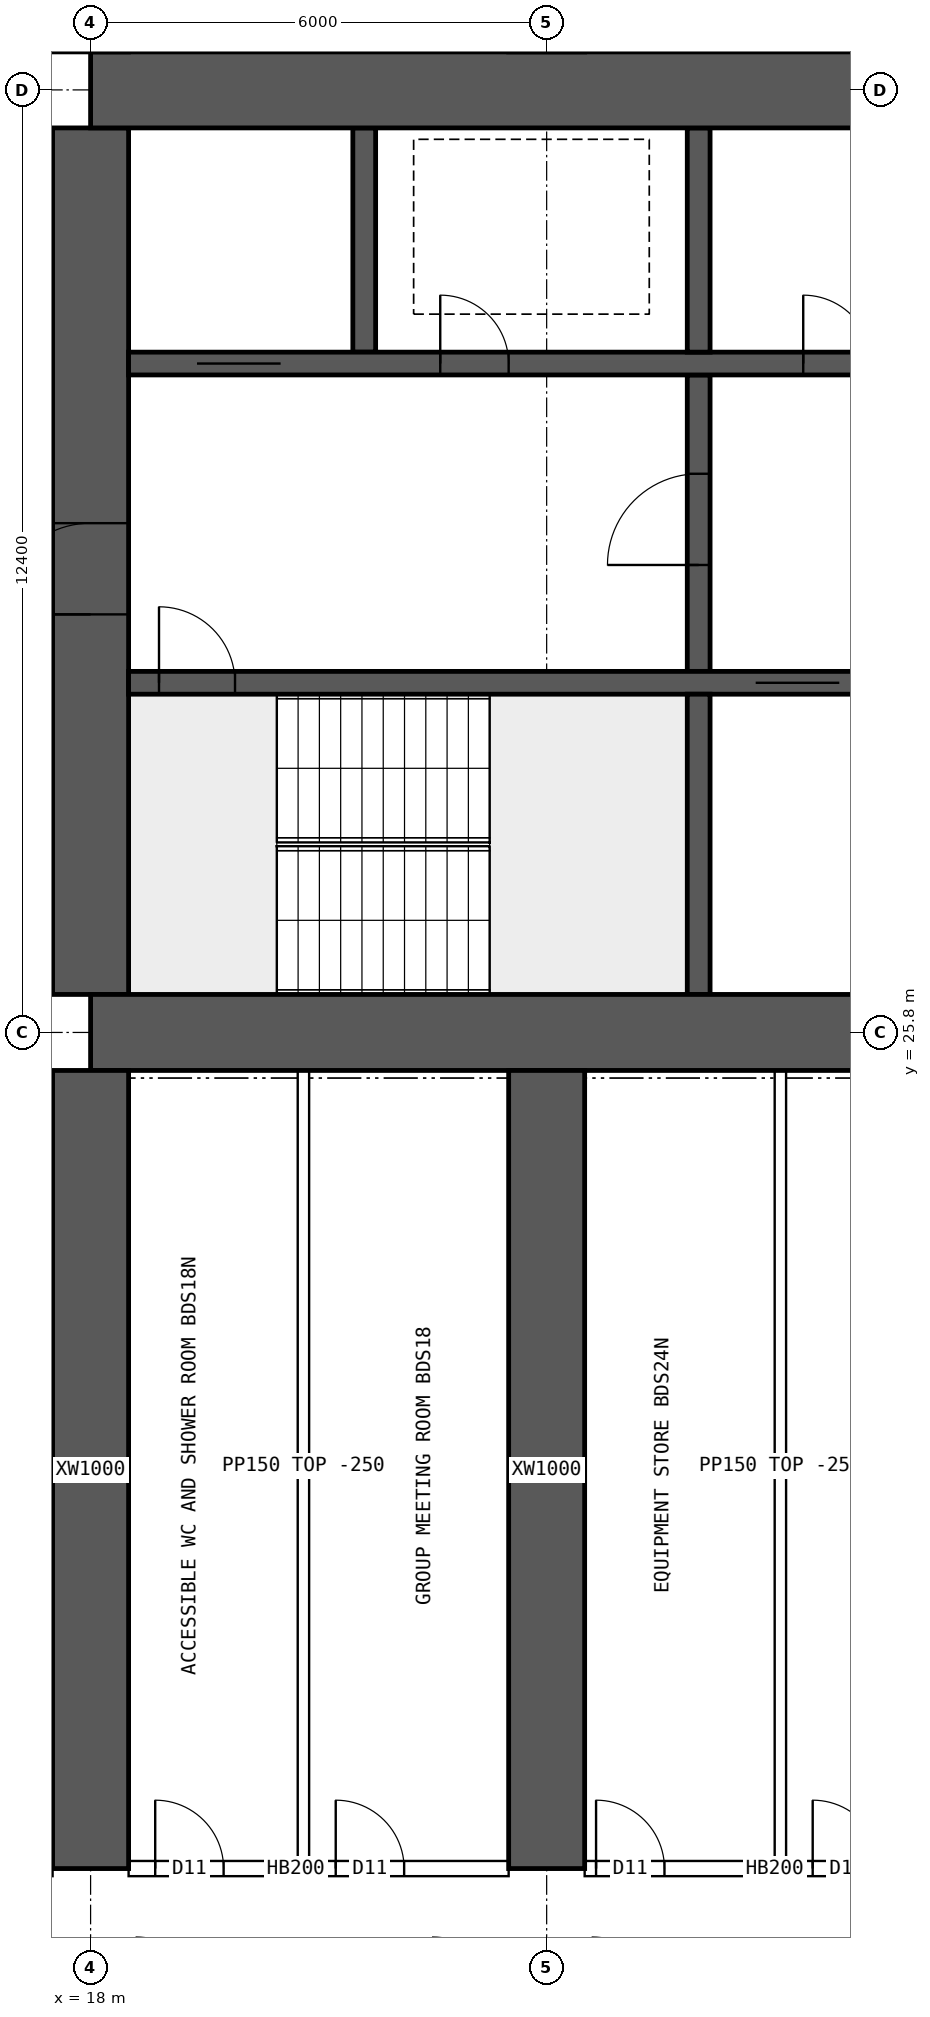
"""IFC4 building model, lengths in metres.
Left out: names, types, materials, properties, quantities, classifications, styles, units other than length and angle.
Written with IfcOpenShell. Run it as: python <this file> out.ifc"""

import sys

from ifc_helpers import new_model, si_unit, direction, frame, frame_2d, origin, place, context, subcontext, project, spatial, rectangle, extrude, element, fill, save


model = new_model("IFC4")
c1 = context("Model", 3, precision=1e-05, world=origin(), true_north=direction((0.0, 1.0)))
c2 = subcontext(c1, "Body", "Model", "MODEL_VIEW")
j1 = project(units=[si_unit("LENGTHUNIT", "METRE"), si_unit("PLANEANGLEUNIT", "RADIAN")], contexts=[c1])
p1 = place(None, origin())
s1 = spatial("IfcSite", under=j1, at=p1, CompositionType="ELEMENT")
p2 = place(p1, origin())
s2 = spatial("IfcBuilding", under=s1, at=p2, CompositionType="ELEMENT")
p3 = place(p2, frame((0.0, 0.0, 31.45)))
s3 = spatial("IfcBuildingStorey", under=s2, at=p3, CompositionType="ELEMENT", Elevation=31.45)
for number, where, z_axis, x_axis in (
    (1, (18.0, 25.8, 0.0), (0.0, 0.0, 1.0), (1.0, 0.0, 0.0)),
    (2, (18.0, 38.2, 0.0), (0.0, 0.0, 1.0), (1.0, 0.0, 0.0)),
):
    element("IfcWall", number, at=place(p3, frame(where, z_axis=z_axis, x_axis=x_axis)), inside=s3, PredefinedType="SHEAR", context=c2, shape_type="SweptSolid", body=[
        extrude(rectangle(XDim=48.0, YDim=1.0, at=frame_2d((24.0, 0.0))), origin(), (0.0, 0.0, 1.0), 3.75),
    ])
p4 = place(p3, frame((18.0, 26.3, 0.0), z_axis=(0.0, 0.0, 1.0), x_axis=(0.0, 1.0, 0.0)))
e3 = element("IfcWall", 3, at=p4, inside=s3, PredefinedType="SHEAR", context=c2, shape_type="SweptSolid", body=[
    extrude(rectangle(XDim=11.4, YDim=1.0, at=frame_2d((5.7, 0.0))), origin(), (0.0, 0.0, 1.0), 3.75),
])
p5 = place(p4, frame((5.0, 0.0, 0.0)))
e4 = element("IfcOpeningElement", 4, at=p5, cuts=e3, PredefinedType="OPENING", context=c2, shape_type="SweptSolid", body=[
    extrude(rectangle(XDim=1.2, YDim=2.1, at=frame_2d((0.6, 1.05))), frame((0.0, 0.51, 0.0), z_axis=(0.0, -1.0, 0.0), x_axis=(1.0, 0.0, 0.0)), (0.0, 0.0, 1.0), 1.02),
])
p6 = place(p3, frame((18.5, 30.4, 0.0), z_axis=(0.0, 0.0, 1.0), x_axis=(1.0, 0.0, 0.0)))
e5 = element("IfcWall", 5, at=p6, inside=s3, PredefinedType="SHEAR", context=c2, shape_type="SweptSolid", body=[
    extrude(rectangle(XDim=47.0, YDim=0.3, at=frame_2d((23.5, 0.0))), origin(), (0.0, 0.0, 1.0), 3.75),
])
p7 = place(p6, frame((0.4, 0.0, 0.0)))
e6 = element("IfcOpeningElement", 6, at=p7, cuts=e5, PredefinedType="OPENING", context=c2, shape_type="SweptSolid", body=[
    extrude(rectangle(XDim=1.0, YDim=2.1, at=frame_2d((0.5, 1.05))), frame((0.0, 0.16, 0.0), z_axis=(0.0, -1.0, 0.0), x_axis=(1.0, 0.0, 0.0)), (0.0, 0.0, 1.0), 0.32),
])
p8 = place(p6, frame((45.6, 0.0, 0.0)))
e7 = element("IfcOpeningElement", 7, at=p8, cuts=e5, PredefinedType="OPENING", context=c2, shape_type="SweptSolid", body=[
    extrude(rectangle(XDim=1.0, YDim=2.1, at=frame_2d((0.5, 1.05))), frame((0.0, 0.16, 0.0), z_axis=(0.0, -1.0, 0.0), x_axis=(1.0, 0.0, 0.0)), (0.0, 0.0, 1.0), 0.32),
])
p9 = place(p6, frame((8.25, 0.0, 0.0)))
e8 = element("IfcOpeningElement", 8, at=p9, cuts=e5, PredefinedType="OPENING", context=c2, shape_type="SweptSolid", body=[
    extrude(rectangle(XDim=1.1, YDim=2.1, at=frame_2d((0.55, 1.05))), frame((0.0, 0.16, 0.0), z_axis=(0.0, -1.0, 0.0), x_axis=(1.0, 0.0, 0.0)), (0.0, 0.0, 1.0), 0.32),
])
p10 = place(p6, frame((10.85, 0.0, 0.0)))
e9 = element("IfcOpeningElement", 9, at=p10, cuts=e5, PredefinedType="OPENING", context=c2, shape_type="SweptSolid", body=[
    extrude(rectangle(XDim=1.1, YDim=2.1, at=frame_2d((0.55, 1.05))), frame((0.0, 0.16, 0.0), z_axis=(0.0, -1.0, 0.0), x_axis=(1.0, 0.0, 0.0)), (0.0, 0.0, 1.0), 0.32),
])
p11 = place(p6, frame((13.45, 0.0, 0.0)))
e10 = element("IfcOpeningElement", 10, at=p11, cuts=e5, PredefinedType="OPENING", context=c2, shape_type="SweptSolid", body=[
    extrude(rectangle(XDim=1.1, YDim=2.1, at=frame_2d((0.55, 1.05))), frame((0.0, 0.16, 0.0), z_axis=(0.0, -1.0, 0.0), x_axis=(1.0, 0.0, 0.0)), (0.0, 0.0, 1.0), 0.32),
])
p12 = place(p6, frame((16.05, 0.0, 0.0)))
e11 = element("IfcOpeningElement", 11, at=p12, cuts=e5, PredefinedType="OPENING", context=c2, shape_type="SweptSolid", body=[
    extrude(rectangle(XDim=1.1, YDim=2.1, at=frame_2d((0.55, 1.05))), frame((0.0, 0.16, 0.0), z_axis=(0.0, -1.0, 0.0), x_axis=(1.0, 0.0, 0.0)), (0.0, 0.0, 1.0), 0.32),
])
p13 = place(p6, frame((30.117, 0.0, 0.0)))
e12 = element("IfcOpeningElement", 12, at=p13, cuts=e5, PredefinedType="OPENING", context=c2, shape_type="SweptSolid", body=[
    extrude(rectangle(XDim=1.1, YDim=2.1, at=frame_2d((0.55, 1.05))), frame((0.0, 0.16, 0.0), z_axis=(0.0, -1.0, 0.0), x_axis=(1.0, 0.0, 0.0)), (0.0, 0.0, 1.0), 0.32),
])
p14 = place(p6, frame((33.65, 0.0, 0.0)))
e13 = element("IfcOpeningElement", 13, at=p14, cuts=e5, PredefinedType="OPENING", context=c2, shape_type="SweptSolid", body=[
    extrude(rectangle(XDim=1.1, YDim=2.1, at=frame_2d((0.55, 1.05))), frame((0.0, 0.16, 0.0), z_axis=(0.0, -1.0, 0.0), x_axis=(1.0, 0.0, 0.0)), (0.0, 0.0, 1.0), 0.32),
])
p15 = place(p6, frame((37.183, 0.0, 0.0)))
e14 = element("IfcOpeningElement", 14, at=p15, cuts=e5, PredefinedType="OPENING", context=c2, shape_type="SweptSolid", body=[
    extrude(rectangle(XDim=1.1, YDim=2.1, at=frame_2d((0.55, 1.05))), frame((0.0, 0.16, 0.0), z_axis=(0.0, -1.0, 0.0), x_axis=(1.0, 0.0, 0.0)), (0.0, 0.0, 1.0), 0.32),
])
p16 = place(p3, frame((18.5, 34.6, 0.0), z_axis=(0.0, 0.0, 1.0), x_axis=(1.0, 0.0, 0.0)))
e15 = element("IfcWall", 15, at=p16, inside=s3, PredefinedType="SHEAR", context=c2, shape_type="SweptSolid", body=[
    extrude(rectangle(XDim=47.0, YDim=0.3, at=frame_2d((23.5, 0.0))), origin(), (0.0, 0.0, 1.0), 3.75),
])
p17 = place(p16, frame((0.9, 0.0, 0.0)))
e16 = element("IfcOpeningElement", 16, at=p17, cuts=e15, PredefinedType="OPENING", context=c2, shape_type="SweptSolid", body=[
    extrude(rectangle(XDim=1.1, YDim=2.1, at=frame_2d((0.55, 1.05))), frame((0.0, 0.16, 0.0), z_axis=(0.0, -1.0, 0.0), x_axis=(1.0, 0.0, 0.0)), (0.0, 0.0, 1.0), 0.32),
])
p18 = place(p16, frame((45.0, 0.0, 0.0)))
e17 = element("IfcOpeningElement", 17, at=p18, cuts=e15, PredefinedType="OPENING", context=c2, shape_type="SweptSolid", body=[
    extrude(rectangle(XDim=1.1, YDim=2.1, at=frame_2d((0.55, 1.05))), frame((0.0, 0.16, 0.0), z_axis=(0.0, -1.0, 0.0), x_axis=(1.0, 0.0, 0.0)), (0.0, 0.0, 1.0), 0.32),
])
p19 = place(p16, frame((4.1, 0.0, 0.0)))
e18 = element("IfcOpeningElement", 18, at=p19, cuts=e15, PredefinedType="OPENING", context=c2, shape_type="SweptSolid", body=[
    extrude(rectangle(XDim=0.9, YDim=2.1, at=frame_2d((0.45, 1.05))), frame((0.0, 0.16, 0.0), z_axis=(0.0, -1.0, 0.0), x_axis=(1.0, 0.0, 0.0)), (0.0, 0.0, 1.0), 0.32),
])
p20 = place(p16, frame((42.0, 0.0, 0.0)))
e19 = element("IfcOpeningElement", 19, at=p20, cuts=e15, PredefinedType="OPENING", context=c2, shape_type="SweptSolid", body=[
    extrude(rectangle(XDim=0.9, YDim=2.1, at=frame_2d((0.45, 1.05))), frame((0.0, 0.16, 0.0), z_axis=(0.0, -1.0, 0.0), x_axis=(1.0, 0.0, 0.0)), (0.0, 0.0, 1.0), 0.32),
])
p21 = place(p16, frame((8.875, 0.0, 0.0)))
e20 = element("IfcOpeningElement", 20, at=p21, cuts=e15, PredefinedType="OPENING", context=c2, shape_type="SweptSolid", body=[
    extrude(rectangle(XDim=0.9, YDim=2.1, at=frame_2d((0.45, 1.05))), frame((0.0, 0.16, 0.0), z_axis=(0.0, -1.0, 0.0), x_axis=(1.0, 0.0, 0.0)), (0.0, 0.0, 1.0), 0.32),
])
p22 = place(p16, frame((12.849, 0.0, 0.0)))
e21 = element("IfcOpeningElement", 21, at=p22, cuts=e15, PredefinedType="OPENING", context=c2, shape_type="SweptSolid", body=[
    extrude(rectangle(XDim=0.9, YDim=2.1, at=frame_2d((0.45, 1.05))), frame((0.0, 0.16, 0.0), z_axis=(0.0, -1.0, 0.0), x_axis=(1.0, 0.0, 0.0)), (0.0, 0.0, 1.0), 0.32),
])
p23 = place(p16, frame((16.496, 0.0, 0.0)))
e22 = element("IfcOpeningElement", 22, at=p23, cuts=e15, PredefinedType="OPENING", context=c2, shape_type="SweptSolid", body=[
    extrude(rectangle(XDim=0.9, YDim=2.1, at=frame_2d((0.45, 1.05))), frame((0.0, 0.16, 0.0), z_axis=(0.0, -1.0, 0.0), x_axis=(1.0, 0.0, 0.0)), (0.0, 0.0, 1.0), 0.32),
])
p24 = place(p16, frame((20.255, 0.0, 0.0)))
e23 = element("IfcOpeningElement", 23, at=p24, cuts=e15, PredefinedType="OPENING", context=c2, shape_type="SweptSolid", body=[
    extrude(rectangle(XDim=0.9, YDim=2.1, at=frame_2d((0.45, 1.05))), frame((0.0, 0.16, 0.0), z_axis=(0.0, -1.0, 0.0), x_axis=(1.0, 0.0, 0.0)), (0.0, 0.0, 1.0), 0.32),
])
p25 = place(p16, frame((24.661, 0.0, 0.0)))
e24 = element("IfcOpeningElement", 24, at=p25, cuts=e15, PredefinedType="OPENING", context=c2, shape_type="SweptSolid", body=[
    extrude(rectangle(XDim=0.9, YDim=2.1, at=frame_2d((0.45, 1.05))), frame((0.0, 0.16, 0.0), z_axis=(0.0, -1.0, 0.0), x_axis=(1.0, 0.0, 0.0)), (0.0, 0.0, 1.0), 0.32),
])
p26 = place(p16, frame((27.458, 0.0, 0.0)))
e25 = element("IfcOpeningElement", 25, at=p26, cuts=e15, PredefinedType="OPENING", context=c2, shape_type="SweptSolid", body=[
    extrude(rectangle(XDim=0.9, YDim=2.1, at=frame_2d((0.45, 1.05))), frame((0.0, 0.16, 0.0), z_axis=(0.0, -1.0, 0.0), x_axis=(1.0, 0.0, 0.0)), (0.0, 0.0, 1.0), 0.32),
])
p27 = place(p16, frame((29.425, 0.0, 0.0)))
e26 = element("IfcOpeningElement", 26, at=p27, cuts=e15, PredefinedType="OPENING", context=c2, shape_type="SweptSolid", body=[
    extrude(rectangle(XDim=0.9, YDim=2.1, at=frame_2d((0.45, 1.05))), frame((0.0, 0.16, 0.0), z_axis=(0.0, -1.0, 0.0), x_axis=(1.0, 0.0, 0.0)), (0.0, 0.0, 1.0), 0.32),
])
p28 = place(p16, frame((31.857, 0.0, 0.0)))
e27 = element("IfcOpeningElement", 27, at=p28, cuts=e15, PredefinedType="OPENING", context=c2, shape_type="SweptSolid", body=[
    extrude(rectangle(XDim=0.9, YDim=2.1, at=frame_2d((0.45, 1.05))), frame((0.0, 0.16, 0.0), z_axis=(0.0, -1.0, 0.0), x_axis=(1.0, 0.0, 0.0)), (0.0, 0.0, 1.0), 0.32),
])
p29 = place(p16, frame((34.592, 0.0, 0.0)))
e28 = element("IfcOpeningElement", 28, at=p29, cuts=e15, PredefinedType="OPENING", context=c2, shape_type="SweptSolid", body=[
    extrude(rectangle(XDim=0.9, YDim=2.1, at=frame_2d((0.45, 1.05))), frame((0.0, 0.16, 0.0), z_axis=(0.0, -1.0, 0.0), x_axis=(1.0, 0.0, 0.0)), (0.0, 0.0, 1.0), 0.32),
])
p30 = place(p16, frame((37.632, 0.0, 0.0)))
e29 = element("IfcOpeningElement", 29, at=p30, cuts=e15, PredefinedType="OPENING", context=c2, shape_type="SweptSolid", body=[
    extrude(rectangle(XDim=0.9, YDim=2.1, at=frame_2d((0.45, 1.05))), frame((0.0, 0.16, 0.0), z_axis=(0.0, -1.0, 0.0), x_axis=(1.0, 0.0, 0.0)), (0.0, 0.0, 1.0), 0.32),
])
p31 = place(p3, frame((26.0, 26.3, 0.0), z_axis=(0.0, 0.0, 1.0), x_axis=(0.0, 1.0, 0.0)))
e30 = element("IfcWall", 30, at=p31, inside=s3, PredefinedType="SHEAR", context=c2, shape_type="SweptSolid", body=[
    extrude(rectangle(XDim=3.95, YDim=0.3, at=frame_2d((1.975, 0.0))), origin(), (0.0, 0.0, 1.0), 3.75),
])
p32 = place(p3, frame((26.0, 30.55, 0.0), z_axis=(0.0, 0.0, 1.0), x_axis=(0.0, 1.0, 0.0)))
e31 = element("IfcWall", 31, at=p32, inside=s3, PredefinedType="SHEAR", context=c2, shape_type="SweptSolid", body=[
    extrude(rectangle(XDim=3.9, YDim=0.3, at=frame_2d((1.95, 0.0))), origin(), (0.0, 0.0, 1.0), 3.75),
])
p33 = place(p32, frame((1.4, 0.0, 0.0)))
e32 = element("IfcOpeningElement", 32, at=p33, cuts=e31, PredefinedType="OPENING", context=c2, shape_type="SweptSolid", body=[
    extrude(rectangle(XDim=1.2, YDim=2.1, at=frame_2d((0.6, 1.05))), frame((0.0, 0.16, 0.0), z_axis=(0.0, -1.0, 0.0), x_axis=(1.0, 0.0, 0.0)), (0.0, 0.0, 1.0), 0.32),
])
for number, where, z_axis, x_axis in (
    (33, (21.6, 34.75, 0.0), (0.0, 0.0, 1.0), (0.0, 1.0, 0.0)),
    (34, (26.0, 34.75, 0.0), (0.0, 0.0, 1.0), (0.0, 1.0, 0.0)),
):
    element("IfcWall", number, at=place(p3, frame(where, z_axis=z_axis, x_axis=x_axis)), inside=s3, PredefinedType="SHEAR", context=c2, shape_type="SweptSolid", body=[
        extrude(rectangle(XDim=2.95, YDim=0.3, at=frame_2d((1.475, 0.0))), origin(), (0.0, 0.0, 1.0), 3.75),
    ])
for number, where, z_axis, x_axis in (
    (35, (18.0, 14.8, 0.0), (0.0, 0.0, 1.0), (0.0, 1.0, 0.0)),
    (36, (24.0, 14.8, 0.0), (0.0, 0.0, 1.0), (0.0, 1.0, 0.0)),
):
    element("IfcWall", number, at=place(p3, frame(where, z_axis=z_axis, x_axis=x_axis)), inside=s3, PredefinedType="SHEAR", context=c2, shape_type="SweptSolid", body=[
        extrude(rectangle(XDim=10.5, YDim=1.0, at=frame_2d((5.25, 0.0))), origin(), (0.0, 0.0, 1.0), 3.75),
    ])
p34 = place(p3, frame((18.5, 14.8, 0.0), z_axis=(0.0, 0.0, 1.0), x_axis=(1.0, 0.0, 0.0)))
e37 = element("IfcWall", 37, at=p34, inside=s3, PredefinedType="SOLIDWALL", context=c2, shape_type="SweptSolid", body=[
    extrude(rectangle(XDim=5.0, YDim=0.2, at=frame_2d((2.5, 0.0))), origin(), (0.0, 0.0, 1.0), 3.5),
])
p35 = place(p34, frame((0.35, 0.0, 0.0)))
e38 = element("IfcOpeningElement", 38, at=p35, cuts=e37, PredefinedType="OPENING", context=c2, shape_type="SweptSolid", body=[
    extrude(rectangle(XDim=0.9, YDim=2.1, at=frame_2d((0.45, 1.05))), frame((0.0, 0.11, 0.0), z_axis=(0.0, -1.0, 0.0), x_axis=(1.0, 0.0, 0.0)), (0.0, 0.0, 1.0), 0.22),
])
p36 = place(p34, frame((2.725, 0.0, 0.0)))
e39 = element("IfcOpeningElement", 39, at=p36, cuts=e37, PredefinedType="OPENING", context=c2, shape_type="SweptSolid", body=[
    extrude(rectangle(XDim=0.9, YDim=2.1, at=frame_2d((0.45, 1.05))), frame((0.0, 0.11, 0.0), z_axis=(0.0, -1.0, 0.0), x_axis=(1.0, 0.0, 0.0)), (0.0, 0.0, 1.0), 0.22),
])
p37 = place(p3, frame((24.5, 14.8, 0.0), z_axis=(0.0, 0.0, 1.0), x_axis=(1.0, 0.0, 0.0)))
e40 = element("IfcWall", 40, at=p37, inside=s3, PredefinedType="SOLIDWALL", context=c2, shape_type="SweptSolid", body=[
    extrude(rectangle(XDim=5.0, YDim=0.2, at=frame_2d((2.5, 0.0))), origin(), (0.0, 0.0, 1.0), 3.5),
])
p38 = place(p37, frame((0.15, 0.0, 0.0)))
e41 = element("IfcOpeningElement", 41, at=p38, cuts=e40, PredefinedType="OPENING", context=c2, shape_type="SweptSolid", body=[
    extrude(rectangle(XDim=0.9, YDim=2.1, at=frame_2d((0.45, 1.05))), frame((0.0, 0.11, 0.0), z_axis=(0.0, -1.0, 0.0), x_axis=(1.0, 0.0, 0.0)), (0.0, 0.0, 1.0), 0.22),
])
p39 = place(p37, frame((3.0, 0.0, 0.0)))
e42 = element("IfcOpeningElement", 42, at=p39, cuts=e40, PredefinedType="OPENING", context=c2, shape_type="SweptSolid", body=[
    extrude(rectangle(XDim=0.9, YDim=2.1, at=frame_2d((0.45, 1.05))), frame((0.0, 0.11, 0.0), z_axis=(0.0, -1.0, 0.0), x_axis=(1.0, 0.0, 0.0)), (0.0, 0.0, 1.0), 0.22),
])
for number, where, z_axis, x_axis in (
    (43, (20.8, 14.9, 0.0), (0.0, 0.0, 1.0), (0.0, 1.0, 0.0)),
    (44, (27.075, 14.9, 0.0), (0.0, 0.0, 1.0), (0.0, 1.0, 0.0)),
):
    element("IfcWall", number, at=place(p3, frame(where, z_axis=z_axis, x_axis=x_axis)), inside=s3, PredefinedType="PARTITIONING", context=c2, shape_type="SweptSolid", body=[
        extrude(rectangle(XDim=10.4, YDim=0.15, at=frame_2d((5.2, 0.0))), origin(), (0.0, 0.0, 1.0), 3.5),
    ])
p40 = place(p5, origin())
e45 = element("IfcDoor", 45, at=p40, inside=s3, OperationType="SINGLE_SWING_LEFT", PredefinedType="DOOR", context=c2, shape_type="SweptSolid", body=[
    extrude(rectangle(XDim=1.2, YDim=2.1, at=frame_2d((0.6, 1.05))), frame((0.0, 0.025, 0.0), z_axis=(0.0, -1.0, 0.0), x_axis=(1.0, 0.0, 0.0)), (0.0, 0.0, 1.0), 0.05),
])
fill(e4, e45)
p41 = place(p7, origin())
e46 = element("IfcDoor", 46, at=p41, inside=s3, OperationType="SINGLE_SWING_LEFT", PredefinedType="DOOR", context=c2, shape_type="SweptSolid", body=[
    extrude(rectangle(XDim=1.0, YDim=2.1, at=frame_2d((0.5, 1.05))), frame((0.0, 0.025, 0.0), z_axis=(0.0, -1.0, 0.0), x_axis=(1.0, 0.0, 0.0)), (0.0, 0.0, 1.0), 0.05),
])
fill(e6, e46)
p42 = place(p17, origin())
e47 = element("IfcDoor", 47, at=p42, inside=s3, OperationType="DOUBLE_DOOR_SLIDING", PredefinedType="DOOR", context=c2, shape_type="SweptSolid", body=[
    extrude(rectangle(XDim=1.1, YDim=2.1, at=frame_2d((0.55, 1.05))), frame((0.0, 0.025, 0.0), z_axis=(0.0, -1.0, 0.0), x_axis=(1.0, 0.0, 0.0)), (0.0, 0.0, 1.0), 0.05),
])
fill(e16, e47)
p43 = place(p19, origin())
e48 = element("IfcDoor", 48, at=p43, inside=s3, OperationType="SINGLE_SWING_LEFT", PredefinedType="DOOR", context=c2, shape_type="SweptSolid", body=[
    extrude(rectangle(XDim=0.9, YDim=2.1, at=frame_2d((0.45, 1.05))), frame((0.0, 0.025, 0.0), z_axis=(0.0, -1.0, 0.0), x_axis=(1.0, 0.0, 0.0)), (0.0, 0.0, 1.0), 0.05),
])
fill(e18, e48)
p44 = place(p33, origin())
e49 = element("IfcDoor", 49, at=p44, inside=s3, OperationType="SINGLE_SWING_LEFT", PredefinedType="DOOR", context=c2, shape_type="SweptSolid", body=[
    extrude(rectangle(XDim=1.2, YDim=2.1, at=frame_2d((0.6, 1.05))), frame((0.0, 0.025, 0.0), z_axis=(0.0, -1.0, 0.0), x_axis=(1.0, 0.0, 0.0)), (0.0, 0.0, 1.0), 0.05),
])
fill(e32, e49)
p45 = place(p21, origin())
e50 = element("IfcDoor", 50, at=p45, inside=s3, OperationType="SINGLE_SWING_LEFT", PredefinedType="DOOR", context=c2, shape_type="SweptSolid", body=[
    extrude(rectangle(XDim=0.9, YDim=2.1, at=frame_2d((0.45, 1.05))), frame((0.0, 0.025, 0.0), z_axis=(0.0, -1.0, 0.0), x_axis=(1.0, 0.0, 0.0)), (0.0, 0.0, 1.0), 0.05),
])
fill(e20, e50)
p46 = place(p9, origin())
e51 = element("IfcDoor", 51, at=p46, inside=s3, OperationType="DOUBLE_DOOR_SLIDING", PredefinedType="DOOR", context=c2, shape_type="SweptSolid", body=[
    extrude(rectangle(XDim=1.1, YDim=2.1, at=frame_2d((0.55, 1.05))), frame((0.0, 0.025, 0.0), z_axis=(0.0, -1.0, 0.0), x_axis=(1.0, 0.0, 0.0)), (0.0, 0.0, 1.0), 0.05),
])
fill(e8, e51)
p47 = place(p35, origin())
e52 = element("IfcDoor", 52, at=p47, inside=s3, OperationType="SINGLE_SWING_LEFT", PredefinedType="DOOR", context=c2, shape_type="SweptSolid", body=[
    extrude(rectangle(XDim=0.9, YDim=2.1, at=frame_2d((0.45, 1.05))), frame((0.0, 0.025, 0.0), z_axis=(0.0, -1.0, 0.0), x_axis=(1.0, 0.0, 0.0)), (0.0, 0.0, 1.0), 0.05),
])
fill(e38, e52)
p48 = place(p36, origin())
e53 = element("IfcDoor", 53, at=p48, inside=s3, OperationType="SINGLE_SWING_LEFT", PredefinedType="DOOR", context=c2, shape_type="SweptSolid", body=[
    extrude(rectangle(XDim=0.9, YDim=2.1, at=frame_2d((0.45, 1.05))), frame((0.0, 0.025, 0.0), z_axis=(0.0, -1.0, 0.0), x_axis=(1.0, 0.0, 0.0)), (0.0, 0.0, 1.0), 0.05),
])
fill(e39, e53)
p49 = place(p38, origin())
e54 = element("IfcDoor", 54, at=p49, inside=s3, OperationType="SINGLE_SWING_LEFT", PredefinedType="DOOR", context=c2, shape_type="SweptSolid", body=[
    extrude(rectangle(XDim=0.9, YDim=2.1, at=frame_2d((0.45, 1.05))), frame((0.0, 0.025, 0.0), z_axis=(0.0, -1.0, 0.0), x_axis=(1.0, 0.0, 0.0)), (0.0, 0.0, 1.0), 0.05),
])
fill(e41, e54)
p50 = place(p39, origin())
e55 = element("IfcDoor", 55, at=p50, inside=s3, OperationType="SINGLE_SWING_LEFT", PredefinedType="DOOR", context=c2, shape_type="SweptSolid", body=[
    extrude(rectangle(XDim=0.9, YDim=2.1, at=frame_2d((0.45, 1.05))), frame((0.0, 0.025, 0.0), z_axis=(0.0, -1.0, 0.0), x_axis=(1.0, 0.0, 0.0)), (0.0, 0.0, 1.0), 0.05),
])
fill(e42, e55)
save(model, sys.argv[1])
